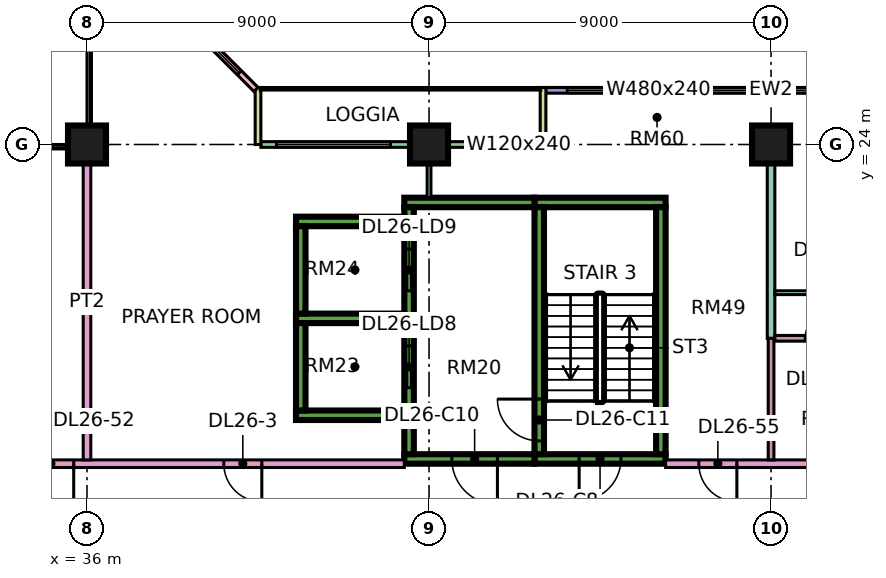
"""IFC4 building model, lengths in metres.
Left out: names, types, materials, properties, quantities, classifications, styles, units other than length and angle.
Written with IfcOpenShell. Run it as: python <this file> out.ifc"""

import sys

from ifc_helpers import new_model, si_unit, direction, frame, frame_2d, origin, origin_2d, place, context, subcontext, project, spatial, rectangle, extrude, element, fill, save


model = new_model("IFC4")
c1 = context("Model", 3, precision=1e-05, world=origin(), true_north=direction((0.0, 1.0)))
c2 = subcontext(c1, "Body", "Model", "MODEL_VIEW")
j1 = project(units=[si_unit("LENGTHUNIT", "METRE"), si_unit("PLANEANGLEUNIT", "RADIAN")], contexts=[c1])
p1 = place(None, origin())
s1 = spatial("IfcSite", under=j1, at=p1, CompositionType="ELEMENT")
p2 = place(p1, origin())
s2 = spatial("IfcBuilding", under=s1, at=p2, CompositionType="ELEMENT")
p3 = place(p2, frame((0.0, 0.0, 114.4)))
s3 = spatial("IfcBuildingStorey", under=s2, at=p3, CompositionType="ELEMENT", Elevation=114.4)
for number, where, z_axis, x_axis in (
    (1, (36.0, 24.0, 0.0), (0.0, 0.0, 1.0), (1.0, 0.0, 0.0)),
    (2, (45.0, 24.0, 0.0), (0.0, 0.0, 1.0), (1.0, 0.0, 0.0)),
    (3, (54.0, 24.0, 0.0), (0.0, 0.0, 1.0), (1.0, 0.0, 0.0)),
):
    element("IfcColumn", number, at=place(p3, frame(where, z_axis=z_axis, x_axis=x_axis)), inside=s3, PredefinedType="COLUMN", context=c2, shape_type="SweptSolid", body=[
        extrude(rectangle(XDim=1.0, YDim=1.0, at=origin_2d()), origin(), (0.0, 0.0, 1.0), 3.75),
    ])
p4 = place(p3, frame((47.775, 15.725, 0.0), z_axis=(0.0, 0.0, 1.0), x_axis=(1.0, 0.0, 0.0)))
e4 = element("IfcWall", 4, at=p4, inside=s3, PredefinedType="SHEAR", context=c2, shape_type="SweptSolid", body=[
    extrude(rectangle(XDim=3.45, YDim=0.25, at=frame_2d((1.725, 0.0))), origin(), (0.0, 0.0, 1.0), 3.75),
])
p5 = place(p4, frame((1.175, 0.0, 0.0)))
e5 = element("IfcOpeningElement", 5, at=p5, cuts=e4, PredefinedType="OPENING", context=c2, shape_type="SweptSolid", body=[
    extrude(rectangle(XDim=1.1, YDim=2.2, at=frame_2d((0.55, 1.1))), frame((0.0, 0.135, 0.0), z_axis=(0.0, -1.0, 0.0), x_axis=(1.0, 0.0, 0.0)), (0.0, 0.0, 1.0), 0.27),
])
p6 = place(p3, frame((47.775, 22.475, 0.0), z_axis=(0.0, 0.0, 1.0), x_axis=(1.0, 0.0, 0.0)))
e6 = element("IfcWall", 6, at=p6, inside=s3, PredefinedType="SHEAR", context=c2, shape_type="SweptSolid", body=[
    extrude(rectangle(XDim=3.45, YDim=0.25, at=frame_2d((1.725, 0.0))), origin(), (0.0, 0.0, 1.0), 3.75),
])
p7 = place(p3, frame((47.9, 15.85, 0.0), z_axis=(0.0, 0.0, 1.0), x_axis=(0.0, 1.0, 0.0)))
e7 = element("IfcWall", 7, at=p7, inside=s3, PredefinedType="SHEAR", context=c2, shape_type="SweptSolid", body=[
    extrude(rectangle(XDim=6.5, YDim=0.25, at=frame_2d((3.25, 0.0))), origin(), (0.0, 0.0, 1.0), 3.75),
])
p8 = place(p7, frame((0.35, 0.0, 0.0)))
e8 = element("IfcOpeningElement", 8, at=p8, cuts=e7, PredefinedType="OPENING", context=c2, shape_type="SweptSolid", body=[
    extrude(rectangle(XDim=1.1, YDim=2.2, at=frame_2d((0.55, 1.1))), frame((0.0, 0.135, 0.0), z_axis=(0.0, -1.0, 0.0), x_axis=(1.0, 0.0, 0.0)), (0.0, 0.0, 1.0), 0.27),
])
p9 = place(p3, frame((51.1, 15.85, 0.0), z_axis=(0.0, 0.0, 1.0), x_axis=(0.0, 1.0, 0.0)))
e9 = element("IfcWall", 9, at=p9, inside=s3, PredefinedType="SHEAR", context=c2, shape_type="SweptSolid", body=[
    extrude(rectangle(XDim=6.5, YDim=0.25, at=frame_2d((3.25, 0.0))), origin(), (0.0, 0.0, 1.0), 3.75),
])
p10 = place(p3, frame((44.35, 15.725, 0.0), z_axis=(0.0, 0.0, 1.0), x_axis=(1.0, 0.0, 0.0)))
e10 = element("IfcWall", 10, at=p10, inside=s3, PredefinedType="SHEAR", context=c2, shape_type="SweptSolid", body=[
    extrude(rectangle(XDim=3.425, YDim=0.25, at=frame_2d((1.712, 0.0))), origin(), (0.0, 0.0, 1.0), 3.75),
])
p11 = place(p10, frame((1.25, 0.0, 0.0)))
e11 = element("IfcOpeningElement", 11, at=p11, cuts=e10, PredefinedType="OPENING", context=c2, shape_type="SweptSolid", body=[
    extrude(rectangle(XDim=1.2, YDim=2.2, at=frame_2d((0.6, 1.1))), frame((0.0, 0.135, 0.0), z_axis=(0.0, -1.0, 0.0), x_axis=(1.0, 0.0, 0.0)), (0.0, 0.0, 1.0), 0.27),
])
p12 = place(p3, frame((44.35, 22.475, 0.0), z_axis=(0.0, 0.0, 1.0), x_axis=(1.0, 0.0, 0.0)))
e12 = element("IfcWall", 12, at=p12, inside=s3, PredefinedType="SHEAR", context=c2, shape_type="SweptSolid", body=[
    extrude(rectangle(XDim=3.425, YDim=0.25, at=frame_2d((1.712, 0.0))), origin(), (0.0, 0.0, 1.0), 3.75),
])
p13 = place(p3, frame((44.475, 15.85, 0.0), z_axis=(0.0, 0.0, 1.0), x_axis=(0.0, 1.0, 0.0)))
e13 = element("IfcWall", 13, at=p13, inside=s3, PredefinedType="SHEAR", context=c2, shape_type="SweptSolid", body=[
    extrude(rectangle(XDim=6.5, YDim=0.25, at=frame_2d((3.25, 0.0))), origin(), (0.0, 0.0, 1.0), 3.75),
])
p14 = place(p13, frame((1.75, 0.0, 0.0)))
e14 = element("IfcOpeningElement", 14, at=p14, cuts=e13, PredefinedType="OPENING", context=c2, shape_type="SweptSolid", body=[
    extrude(rectangle(XDim=1.1, YDim=2.2, at=frame_2d((0.55, 1.1))), frame((0.0, 0.135, 0.0), z_axis=(0.0, -1.0, 0.0), x_axis=(1.0, 0.0, 0.0)), (0.0, 0.0, 1.0), 0.27),
])
p15 = place(p13, frame((4.3, 0.0, 0.0)))
e15 = element("IfcOpeningElement", 15, at=p15, cuts=e13, PredefinedType="OPENING", context=c2, shape_type="SweptSolid", body=[
    extrude(rectangle(XDim=1.1, YDim=2.2, at=frame_2d((0.55, 1.1))), frame((0.0, 0.135, 0.0), z_axis=(0.0, -1.0, 0.0), x_axis=(1.0, 0.0, 0.0)), (0.0, 0.0, 1.0), 0.27),
])
for number, where, z_axis, x_axis in (
    (16, (41.5, 16.875, 0.0), (0.0, 0.0, 1.0), (1.0, 0.0, 0.0)),
    (17, (41.5, 19.425, 0.0), (0.0, 0.0, 1.0), (1.0, 0.0, 0.0)),
    (18, (41.5, 21.975, 0.0), (0.0, 0.0, 1.0), (1.0, 0.0, 0.0)),
):
    element("IfcWall", number, at=place(p3, frame(where, z_axis=z_axis, x_axis=x_axis)), inside=s3, PredefinedType="SHEAR", context=c2, shape_type="SweptSolid", body=[
        extrude(rectangle(XDim=2.85, YDim=0.25, at=frame_2d((1.425, 0.0))), origin(), (0.0, 0.0, 1.0), 3.75),
    ])
for number, where, z_axis, x_axis in (
    (19, (41.625, 17.0, 0.0), (0.0, 0.0, 1.0), (0.0, 1.0, 0.0)),
    (20, (41.625, 19.55, 0.0), (0.0, 0.0, 1.0), (0.0, 1.0, 0.0)),
):
    element("IfcWall", number, at=place(p3, frame(where, z_axis=z_axis, x_axis=x_axis)), inside=s3, PredefinedType="SHEAR", context=c2, shape_type="SweptSolid", body=[
        extrude(rectangle(XDim=2.3, YDim=0.25, at=frame_2d((1.15, 0.0))), origin(), (0.0, 0.0, 1.0), 3.75),
    ])
p16 = place(p3, frame((59.925, 25.425, 0.0), z_axis=(0.0, 0.0, 1.0), x_axis=(-1.0, 0.0, 0.0)))
e21 = element("IfcWall", 21, at=p16, inside=s3, PredefinedType="SOLIDWALL", context=c2, shape_type="SweptSolid", body=[
    extrude(rectangle(XDim=11.85, YDim=0.15, at=frame_2d((5.925, 0.0))), origin(), (0.0, 0.0, 1.0), 3.35),
])
p17 = place(p16, frame((0.562, 0.0, 0.45)))
e22 = element("IfcOpeningElement", 22, at=p17, cuts=e21, PredefinedType="OPENING", context=c2, shape_type="SweptSolid", body=[
    extrude(rectangle(XDim=1.8, YDim=2.4, at=frame_2d((0.9, 1.2))), frame((0.0, 0.085, 0.0), z_axis=(0.0, -1.0, 0.0), x_axis=(1.0, 0.0, 0.0)), (0.0, 0.0, 1.0), 0.17),
])
p18 = place(p16, frame((3.525, 0.0, 0.45)))
e23 = element("IfcOpeningElement", 23, at=p18, cuts=e21, PredefinedType="OPENING", context=c2, shape_type="SweptSolid", body=[
    extrude(rectangle(XDim=1.8, YDim=2.4, at=frame_2d((0.9, 1.2))), frame((0.0, 0.085, 0.0), z_axis=(0.0, -1.0, 0.0), x_axis=(1.0, 0.0, 0.0)), (0.0, 0.0, 1.0), 0.17),
])
p19 = place(p16, frame((6.488, 0.0, 0.45)))
e24 = element("IfcOpeningElement", 24, at=p19, cuts=e21, PredefinedType="OPENING", context=c2, shape_type="SweptSolid", body=[
    extrude(rectangle(XDim=4.8, YDim=2.4, at=frame_2d((2.4, 1.2))), frame((0.0, 0.085, 0.0), z_axis=(0.0, -1.0, 0.0), x_axis=(1.0, 0.0, 0.0)), (0.0, 0.0, 1.0), 0.17),
])
p20 = place(p3, frame((47.925, 24.0, 0.0), z_axis=(0.0, 0.0, 1.0), x_axis=(-1.0, 0.0, 0.0)))
e25 = element("IfcWall", 25, at=p20, inside=s3, PredefinedType="SOLIDWALL", context=c2, shape_type="SweptSolid", body=[
    extrude(rectangle(XDim=7.35, YDim=0.15, at=frame_2d((3.675, 0.0))), origin(), (0.0, 0.0, 1.0), 3.35),
])
p21 = place(p20, frame((0.562, 0.0, 0.45)))
e26 = element("IfcOpeningElement", 26, at=p21, cuts=e25, PredefinedType="OPENING", context=c2, shape_type="SweptSolid", body=[
    extrude(rectangle(XDim=1.2, YDim=2.4, at=frame_2d((0.6, 1.2))), frame((0.0, 0.085, 0.0), z_axis=(0.0, -1.0, 0.0), x_axis=(1.0, 0.0, 0.0)), (0.0, 0.0, 1.0), 0.17),
])
p22 = place(p20, frame((3.938, 0.0, 0.45)))
e27 = element("IfcOpeningElement", 27, at=p22, cuts=e25, PredefinedType="OPENING", context=c2, shape_type="SweptSolid", body=[
    extrude(rectangle(XDim=3.0, YDim=2.4, at=frame_2d((1.5, 1.2))), frame((0.0, 0.085, 0.0), z_axis=(0.0, -1.0, 0.0), x_axis=(1.0, 0.0, 0.0)), (0.0, 0.0, 1.0), 0.17),
])
for number, where, z_axis, x_axis in (
    (28, (48.0, 25.5, 0.0), (0.0, 0.0, 1.0), (0.0, -1.0, 0.0)),
    (29, (40.5, 25.5, 0.0), (0.0, 0.0, 1.0), (0.0, -1.0, 0.0)),
):
    element("IfcWall", number, at=place(p3, frame(where, z_axis=z_axis, x_axis=x_axis)), inside=s3, PredefinedType="SOLIDWALL", context=c2, shape_type="SweptSolid", body=[
        extrude(rectangle(XDim=1.5, YDim=0.15, at=frame_2d((0.75, 0.0))), origin(), (0.0, 0.0, 1.0), 3.35),
    ])
p23 = place(p3, frame((40.447, 25.447, 0.0), z_axis=(0.0, 0.0, 1.0), x_axis=(-0.707106781187, 0.707106781187, 0.0)))
e30 = element("IfcWall", 30, at=p23, inside=s3, PredefinedType="SOLIDWALL", context=c2, shape_type="SweptSolid", body=[
    extrude(rectangle(XDim=4.243, YDim=0.15, at=frame_2d((2.121, 0.0))), origin(), (0.0, 0.0, 1.0), 3.35),
])
p24 = place(p23, frame((0.621, 0.0, 0.45)))
e31 = element("IfcOpeningElement", 31, at=p24, cuts=e30, PredefinedType="OPENING", context=c2, shape_type="SweptSolid", body=[
    extrude(rectangle(XDim=3.0, YDim=2.4, at=frame_2d((1.5, 1.2))), frame((0.0, 0.085, 0.0), z_axis=(0.0, -1.0, 0.0), x_axis=(1.0, 0.0, 0.0)), (0.0, 0.0, 1.0), 0.17),
])
p25 = place(p3, frame((34.0, 15.6, 0.0), z_axis=(0.0, 0.0, 1.0), x_axis=(1.0, 0.0, 0.0)))
e32 = element("IfcWall", 32, at=p25, inside=s3, PredefinedType="PARTITIONING", context=c2, shape_type="SweptSolid", body=[
    extrude(rectangle(XDim=10.35, YDim=0.2, at=frame_2d((5.175, 0.0))), origin(), (0.0, 0.0, 1.0), 3.35),
])
p26 = place(p25, frame((5.6, 0.0, 0.0)))
e33 = element("IfcOpeningElement", 33, at=p26, cuts=e32, PredefinedType="OPENING", context=c2, shape_type="SweptSolid", body=[
    extrude(rectangle(XDim=1.0, YDim=2.1, at=frame_2d((0.5, 1.05))), frame((0.0, 0.11, 0.0), z_axis=(0.0, -1.0, 0.0), x_axis=(1.0, 0.0, 0.0)), (0.0, 0.0, 1.0), 0.22),
])
p27 = place(p25, frame((0.45, 0.0, 0.0)))
e34 = element("IfcOpeningElement", 34, at=p27, cuts=e32, PredefinedType="OPENING", context=c2, shape_type="SweptSolid", body=[
    extrude(rectangle(XDim=1.2, YDim=2.1, at=frame_2d((0.6, 1.05))), frame((0.0, 0.11, 0.0), z_axis=(0.0, -1.0, 0.0), x_axis=(1.0, 0.0, 0.0)), (0.0, 0.0, 1.0), 0.22),
])
p28 = place(p3, frame((36.0, 15.7, 0.0), z_axis=(0.0, 0.0, 1.0), x_axis=(0.0, 1.0, 0.0)))
e35 = element("IfcWall", 35, at=p28, inside=s3, PredefinedType="PARTITIONING", context=c2, shape_type="SweptSolid", body=[
    extrude(rectangle(XDim=8.3, YDim=0.2, at=frame_2d((4.15, 0.0))), origin(), (0.0, 0.0, 1.0), 3.35),
])
p29 = place(p3, frame((45.0, 22.6, 0.0), z_axis=(0.0, 0.0, 1.0), x_axis=(0.0, 1.0, 0.0)))
e36 = element("IfcWall", 36, at=p29, inside=s3, PredefinedType="PARTITIONING", context=c2, shape_type="SweptSolid", body=[
    extrude(rectangle(XDim=1.326, YDim=0.1, at=frame_2d((0.663, 0.0))), origin(), (0.0, 0.0, 1.0), 3.35),
])
p30 = place(p3, frame((51.225, 15.6, 0.0), z_axis=(0.0, 0.0, 1.0), x_axis=(1.0, 0.0, 0.0)))
e37 = element("IfcWall", 37, at=p30, inside=s3, PredefinedType="PARTITIONING", context=c2, shape_type="SweptSolid", body=[
    extrude(rectangle(XDim=20.701, YDim=0.2, at=frame_2d((10.351, 0.0))), origin(), (0.0, 0.0, 1.0), 3.35),
])
p31 = place(p30, frame((9.725, 0.0, 0.0)))
e38 = element("IfcOpeningElement", 38, at=p31, cuts=e37, PredefinedType="OPENING", context=c2, shape_type="SweptSolid", body=[
    extrude(rectangle(XDim=1.0, YDim=2.1, at=frame_2d((0.5, 1.05))), frame((0.0, 0.11, 0.0), z_axis=(0.0, -1.0, 0.0), x_axis=(1.0, 0.0, 0.0)), (0.0, 0.0, 1.0), 0.22),
])
p32 = place(p30, frame((0.875, 0.0, 0.0)))
e39 = element("IfcOpeningElement", 39, at=p32, cuts=e37, PredefinedType="OPENING", context=c2, shape_type="SweptSolid", body=[
    extrude(rectangle(XDim=1.0, YDim=2.1, at=frame_2d((0.5, 1.05))), frame((0.0, 0.11, 0.0), z_axis=(0.0, -1.0, 0.0), x_axis=(1.0, 0.0, 0.0)), (0.0, 0.0, 1.0), 0.22),
])
p33 = place(p3, frame((54.0, 15.7, 0.0), z_axis=(0.0, 0.0, 1.0), x_axis=(0.0, 1.0, 0.0)))
e40 = element("IfcWall", 40, at=p33, inside=s3, PredefinedType="PARTITIONING", context=c2, shape_type="SweptSolid", body=[
    extrude(rectangle(XDim=3.2, YDim=0.15, at=frame_2d((1.6, 0.0))), origin(), (0.0, 0.0, 1.0), 3.35),
])
p34 = place(p3, frame((54.0, 18.9, 0.0), z_axis=(0.0, 0.0, 1.0), x_axis=(0.0, 1.0, 0.0)))
e41 = element("IfcWall", 41, at=p34, inside=s3, PredefinedType="PARTITIONING", context=c2, shape_type="SweptSolid", body=[
    extrude(rectangle(XDim=5.1, YDim=0.2, at=frame_2d((2.55, 0.0))), origin(), (0.0, 0.0, 1.0), 3.35),
])
p35 = place(p3, frame((54.1, 18.9, 0.0), z_axis=(0.0, 0.0, 1.0), x_axis=(1.0, 0.0, 0.0)))
e42 = element("IfcWall", 42, at=p35, inside=s3, PredefinedType="PARTITIONING", context=c2, shape_type="SweptSolid", body=[
    extrude(rectangle(XDim=6.275, YDim=0.15, at=frame_2d((3.137, 0.0))), origin(), (0.0, 0.0, 1.0), 3.35),
])
p36 = place(p35, frame((3.95, 0.0, 0.0)))
e43 = element("IfcOpeningElement", 43, at=p36, cuts=e42, PredefinedType="OPENING", context=c2, shape_type="SweptSolid", body=[
    extrude(rectangle(XDim=0.8, YDim=2.1, at=frame_2d((0.4, 1.05))), frame((0.0, 0.085, 0.0), z_axis=(0.0, -1.0, 0.0), x_axis=(1.0, 0.0, 0.0)), (0.0, 0.0, 1.0), 0.17),
])
p37 = place(p35, frame((0.8, 0.0, 0.0)))
e44 = element("IfcOpeningElement", 44, at=p37, cuts=e42, PredefinedType="OPENING", context=c2, shape_type="SweptSolid", body=[
    extrude(rectangle(XDim=0.8, YDim=2.1, at=frame_2d((0.4, 1.05))), frame((0.0, 0.085, 0.0), z_axis=(0.0, -1.0, 0.0), x_axis=(1.0, 0.0, 0.0)), (0.0, 0.0, 1.0), 0.17),
])
p38 = place(p3, frame((54.1, 20.1, 0.0), z_axis=(0.0, 0.0, 1.0), x_axis=(1.0, 0.0, 0.0)))
e45 = element("IfcWall", 45, at=p38, inside=s3, PredefinedType="PARTITIONING", context=c2, shape_type="SweptSolid", body=[
    extrude(rectangle(XDim=11.95, YDim=0.1, at=frame_2d((5.975, 0.0))), origin(), (0.0, 0.0, 1.0), 3.35),
])
p39 = place(p38, frame((0.95, 0.0, 0.0)))
e46 = element("IfcOpeningElement", 46, at=p39, cuts=e45, PredefinedType="OPENING", context=c2, shape_type="SweptSolid", body=[
    extrude(rectangle(XDim=0.9, YDim=2.1, at=frame_2d((0.45, 1.05))), frame((0.0, 0.06, 0.0), z_axis=(0.0, -1.0, 0.0), x_axis=(1.0, 0.0, 0.0)), (0.0, 0.0, 1.0), 0.12),
])
p40 = place(p38, frame((3.95, 0.0, 0.0)))
e47 = element("IfcOpeningElement", 47, at=p40, cuts=e45, PredefinedType="OPENING", context=c2, shape_type="SweptSolid", body=[
    extrude(rectangle(XDim=0.9, YDim=2.1, at=frame_2d((0.45, 1.05))), frame((0.0, 0.06, 0.0), z_axis=(0.0, -1.0, 0.0), x_axis=(1.0, 0.0, 0.0)), (0.0, 0.0, 1.0), 0.12),
])
p41 = place(p38, frame((6.95, 0.0, 0.0)))
e48 = element("IfcOpeningElement", 48, at=p41, cuts=e45, PredefinedType="OPENING", context=c2, shape_type="SweptSolid", body=[
    extrude(rectangle(XDim=0.9, YDim=2.1, at=frame_2d((0.45, 1.05))), frame((0.0, 0.06, 0.0), z_axis=(0.0, -1.0, 0.0), x_axis=(1.0, 0.0, 0.0)), (0.0, 0.0, 1.0), 0.12),
])
p42 = place(p38, frame((9.95, 0.0, 0.0)))
e49 = element("IfcOpeningElement", 49, at=p42, cuts=e45, PredefinedType="OPENING", context=c2, shape_type="SweptSolid", body=[
    extrude(rectangle(XDim=0.9, YDim=2.1, at=frame_2d((0.45, 1.05))), frame((0.0, 0.06, 0.0), z_axis=(0.0, -1.0, 0.0), x_axis=(1.0, 0.0, 0.0)), (0.0, 0.0, 1.0), 0.12),
])
p43 = place(p18, origin())
e50 = element("IfcWindow", 50, at=p43, inside=s3, PartitioningType="SINGLE_PANEL", PredefinedType="WINDOW", context=c2, shape_type="SweptSolid", body=[
    extrude(rectangle(XDim=1.8, YDim=2.4, at=frame_2d((0.9, 1.2))), frame((0.0, 0.03, 0.0), z_axis=(0.0, -1.0, 0.0), x_axis=(1.0, 0.0, 0.0)), (0.0, 0.0, 1.0), 0.06),
])
fill(e23, e50)
p44 = place(p19, origin())
e51 = element("IfcWindow", 51, at=p44, inside=s3, PartitioningType="SINGLE_PANEL", PredefinedType="WINDOW", context=c2, shape_type="SweptSolid", body=[
    extrude(rectangle(XDim=4.8, YDim=2.4, at=frame_2d((2.4, 1.2))), frame((0.0, 0.03, 0.0), z_axis=(0.0, -1.0, 0.0), x_axis=(1.0, 0.0, 0.0)), (0.0, 0.0, 1.0), 0.06),
])
fill(e24, e51)
p45 = place(p21, origin())
e52 = element("IfcWindow", 52, at=p45, inside=s3, PartitioningType="SINGLE_PANEL", PredefinedType="WINDOW", context=c2, shape_type="SweptSolid", body=[
    extrude(rectangle(XDim=1.2, YDim=2.4, at=frame_2d((0.6, 1.2))), frame((0.0, 0.03, 0.0), z_axis=(0.0, -1.0, 0.0), x_axis=(1.0, 0.0, 0.0)), (0.0, 0.0, 1.0), 0.06),
])
fill(e26, e52)
p46 = place(p22, origin())
e53 = element("IfcWindow", 53, at=p46, inside=s3, PartitioningType="SINGLE_PANEL", PredefinedType="WINDOW", context=c2, shape_type="SweptSolid", body=[
    extrude(rectangle(XDim=3.0, YDim=2.4, at=frame_2d((1.5, 1.2))), frame((0.0, 0.03, 0.0), z_axis=(0.0, -1.0, 0.0), x_axis=(1.0, 0.0, 0.0)), (0.0, 0.0, 1.0), 0.06),
])
fill(e27, e53)
p47 = place(p24, origin())
e54 = element("IfcWindow", 54, at=p47, inside=s3, PartitioningType="SINGLE_PANEL", PredefinedType="WINDOW", context=c2, shape_type="SweptSolid", body=[
    extrude(rectangle(XDim=3.0, YDim=2.4, at=frame_2d((1.5, 1.2))), frame((0.0, 0.03, 0.0), z_axis=(0.0, -1.0, 0.0), x_axis=(1.0, 0.0, 0.0)), (0.0, 0.0, 1.0), 0.06),
])
fill(e31, e54)
p48 = place(p5, frame((1.1, 0.0, 0.0), z_axis=(0.0, 0.0, 1.0), x_axis=(-1.0, 0.0, 0.0)))
e55 = element("IfcDoor", 55, at=p48, inside=s3, OperationType="SINGLE_SWING_LEFT", PredefinedType="DOOR", context=c2, shape_type="SweptSolid", body=[
    extrude(rectangle(XDim=1.1, YDim=2.2, at=frame_2d((0.55, 1.1))), frame((0.0, 0.025, 0.0), z_axis=(0.0, -1.0, 0.0), x_axis=(1.0, 0.0, 0.0)), (0.0, 0.0, 1.0), 0.05),
])
fill(e5, e55)
p49 = place(p11, origin())
e56 = element("IfcDoor", 56, at=p49, inside=s3, OperationType="SINGLE_SWING_RIGHT", PredefinedType="DOOR", context=c2, shape_type="SweptSolid", body=[
    extrude(rectangle(XDim=1.2, YDim=2.2, at=frame_2d((0.6, 1.1))), frame((0.0, 0.025, 0.0), z_axis=(0.0, -1.0, 0.0), x_axis=(1.0, 0.0, 0.0)), (0.0, 0.0, 1.0), 0.05),
])
fill(e11, e56)
p50 = place(p8, frame((1.1, 0.0, 0.0), z_axis=(0.0, 0.0, 1.0), x_axis=(-1.0, 0.0, 0.0)))
e57 = element("IfcDoor", 57, at=p50, inside=s3, OperationType="SINGLE_SWING_RIGHT", PredefinedType="DOOR", context=c2, shape_type="SweptSolid", body=[
    extrude(rectangle(XDim=1.1, YDim=2.2, at=frame_2d((0.55, 1.1))), frame((0.0, 0.025, 0.0), z_axis=(0.0, -1.0, 0.0), x_axis=(1.0, 0.0, 0.0)), (0.0, 0.0, 1.0), 0.05),
])
fill(e8, e57)
p51 = place(p14, origin())
e58 = element("IfcDoor", 58, at=p51, inside=s3, OperationType="DOUBLE_DOOR_SLIDING", PredefinedType="DOOR", context=c2, shape_type="SweptSolid", body=[
    extrude(rectangle(XDim=1.1, YDim=2.2, at=frame_2d((0.55, 1.1))), frame((0.0, 0.025, 0.0), z_axis=(0.0, -1.0, 0.0), x_axis=(1.0, 0.0, 0.0)), (0.0, 0.0, 1.0), 0.05),
])
fill(e14, e58)
p52 = place(p15, origin())
e59 = element("IfcDoor", 59, at=p52, inside=s3, OperationType="DOUBLE_DOOR_SLIDING", PredefinedType="DOOR", context=c2, shape_type="SweptSolid", body=[
    extrude(rectangle(XDim=1.1, YDim=2.2, at=frame_2d((0.55, 1.1))), frame((0.0, 0.025, 0.0), z_axis=(0.0, -1.0, 0.0), x_axis=(1.0, 0.0, 0.0)), (0.0, 0.0, 1.0), 0.05),
])
fill(e15, e59)
p53 = place(p26, origin())
e60 = element("IfcDoor", 60, at=p53, inside=s3, OperationType="SINGLE_SWING_RIGHT", PredefinedType="DOOR", context=c2, shape_type="SweptSolid", body=[
    extrude(rectangle(XDim=1.0, YDim=2.1, at=frame_2d((0.5, 1.05))), frame((0.0, 0.025, 0.0), z_axis=(0.0, -1.0, 0.0), x_axis=(1.0, 0.0, 0.0)), (0.0, 0.0, 1.0), 0.05),
])
fill(e33, e60)
p54 = place(p37, frame((0.8, 0.0, 0.0), z_axis=(0.0, 0.0, 1.0), x_axis=(-1.0, 0.0, 0.0)))
e61 = element("IfcDoor", 61, at=p54, inside=s3, OperationType="SINGLE_SWING_RIGHT", PredefinedType="DOOR", context=c2, shape_type="SweptSolid", body=[
    extrude(rectangle(XDim=0.8, YDim=2.1, at=frame_2d((0.4, 1.05))), frame((0.0, 0.025, 0.0), z_axis=(0.0, -1.0, 0.0), x_axis=(1.0, 0.0, 0.0)), (0.0, 0.0, 1.0), 0.05),
])
fill(e44, e61)
p55 = place(p27, origin())
e62 = element("IfcDoor", 62, at=p55, inside=s3, OperationType="SINGLE_SWING_RIGHT", PredefinedType="DOOR", context=c2, shape_type="SweptSolid", body=[
    extrude(rectangle(XDim=1.2, YDim=2.1, at=frame_2d((0.6, 1.05))), frame((0.0, 0.025, 0.0), z_axis=(0.0, -1.0, 0.0), x_axis=(1.0, 0.0, 0.0)), (0.0, 0.0, 1.0), 0.05),
])
fill(e34, e62)
p56 = place(p32, origin())
e63 = element("IfcDoor", 63, at=p56, inside=s3, OperationType="SINGLE_SWING_RIGHT", PredefinedType="DOOR", context=c2, shape_type="SweptSolid", body=[
    extrude(rectangle(XDim=1.0, YDim=2.1, at=frame_2d((0.5, 1.05))), frame((0.0, 0.025, 0.0), z_axis=(0.0, -1.0, 0.0), x_axis=(1.0, 0.0, 0.0)), (0.0, 0.0, 1.0), 0.05),
])
fill(e39, e63)
save(model, sys.argv[1])
